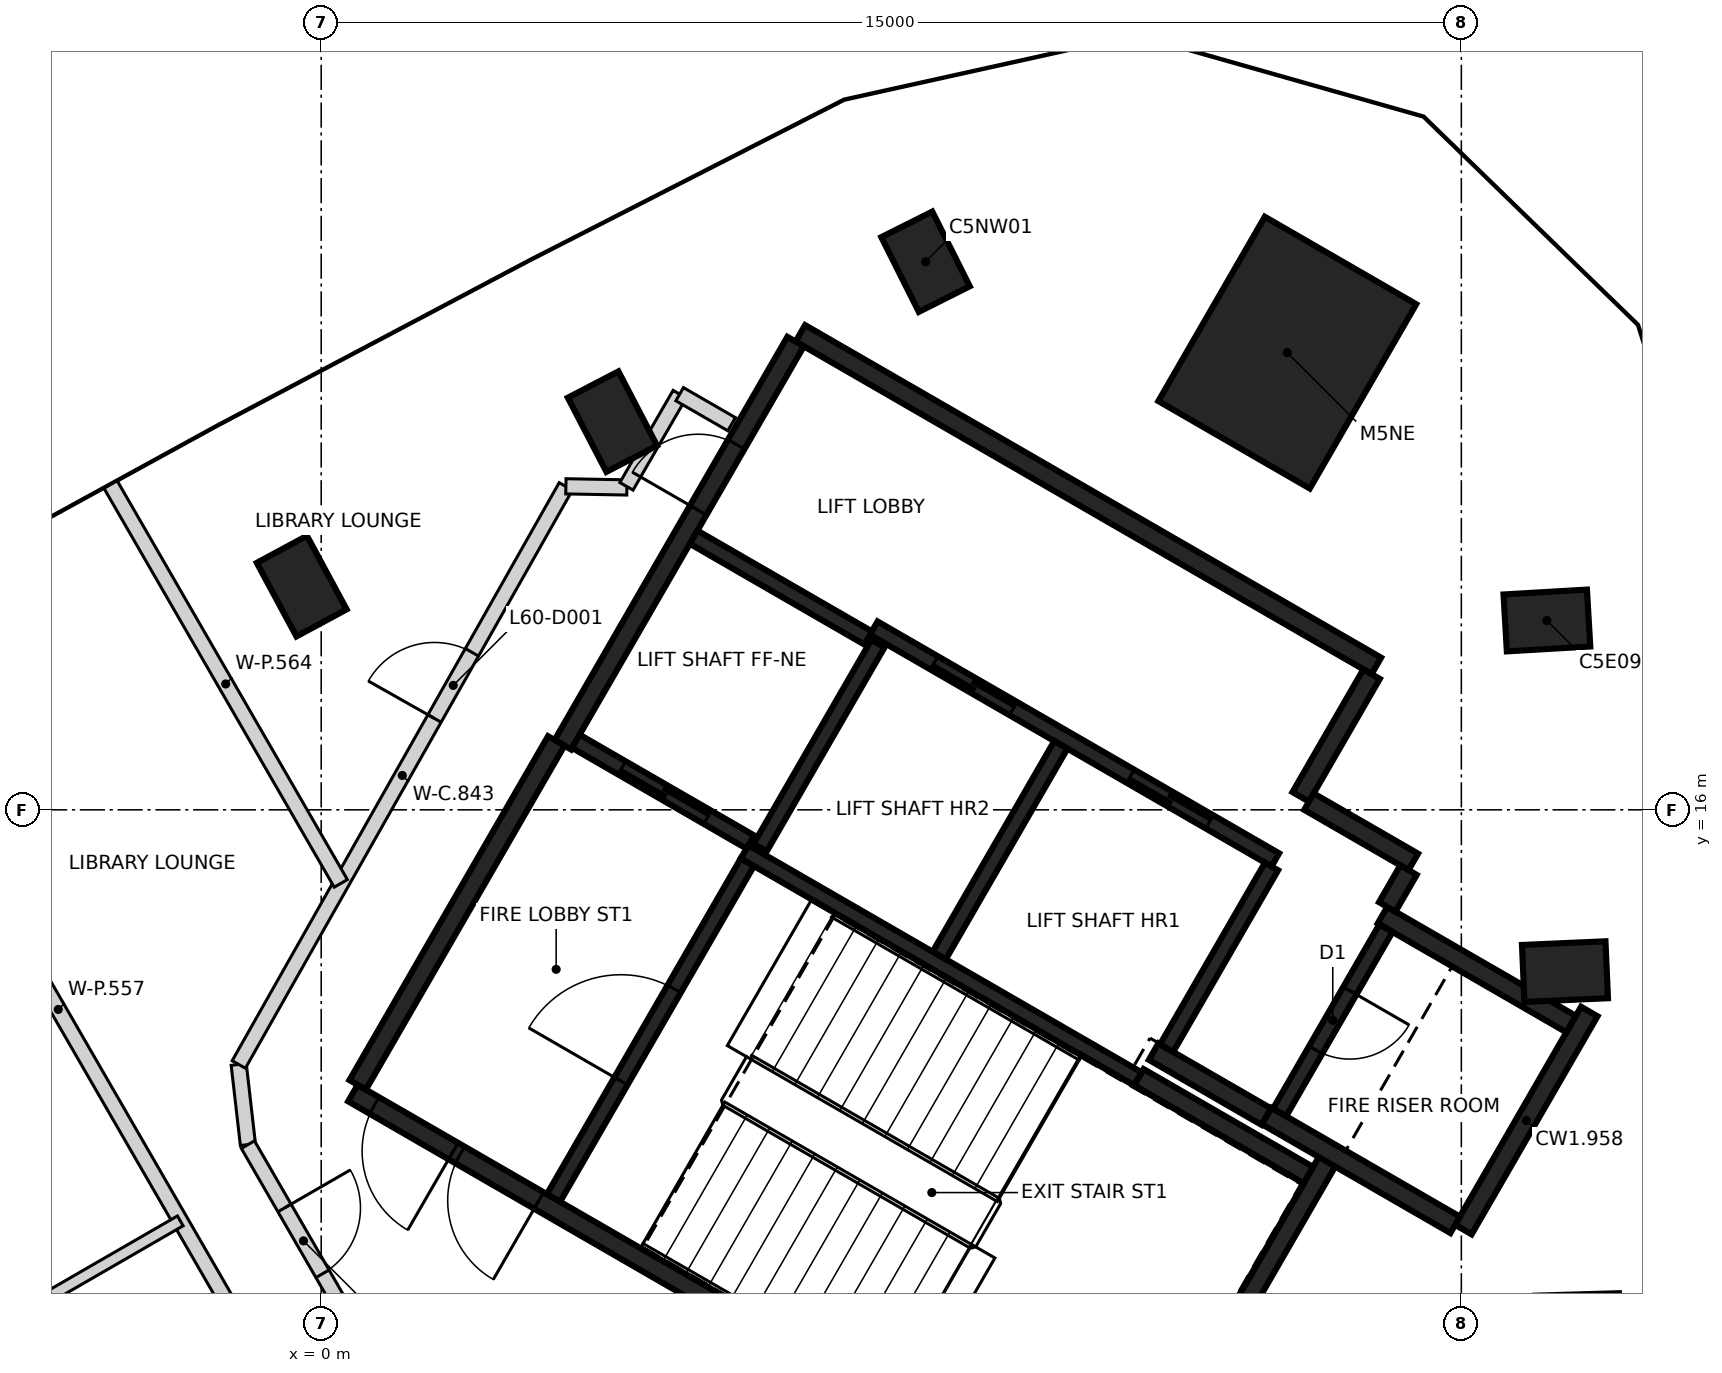
"""IFC4 building model, lengths in metres.
Left out: names, types, materials, properties, quantities, classifications, styles, units other than length and angle.
Written with IfcOpenShell. Run it as: python <this file> out.ifc"""

import sys

from ifc_helpers import new_model, si_unit, direction, frame, frame_2d, origin, origin_2d, place, context, subcontext, project, spatial, rectangle, extrude, element, fill, save


model = new_model("IFC4")
c1 = context("Model", 3, precision=1e-05, world=origin(), true_north=direction((0.0, 1.0)))
c2 = subcontext(c1, "Body", "Model", "MODEL_VIEW")
j1 = project(units=[si_unit("LENGTHUNIT", "METRE"), si_unit("PLANEANGLEUNIT", "RADIAN")], contexts=[c1])
p1 = place(None, origin())
s1 = spatial("IfcSite", under=j1, at=p1, CompositionType="ELEMENT")
p2 = place(p1, origin())
s2 = spatial("IfcBuilding", under=s1, at=p2, CompositionType="ELEMENT")
p3 = place(p2, frame((0.0, 0.0, 239.4)))
s3 = spatial("IfcBuildingStorey", under=s2, at=p3, CompositionType="ELEMENT", Elevation=239.4)
for number, where, z_axis, x_axis in (
    (1, (16.363, 13.872, -0.35), (0.0, 0.0, 1.0), (0.999, 0.044, 0.0)),
    (2, (16.125, 18.491, -0.35), (0.0, 0.0, 1.0), (0.998, 0.058, 0.0)),
    (3, (7.951, 23.211, -0.35), (0.0, 0.0, 1.0), (-0.449, 0.894, 0.0)),
    (4, (3.832, 21.107, -0.35), (0.0, 0.0, 1.0), (-0.461, 0.887, 0.0)),
    (5, (-0.256, 18.943, -0.35), (0.0, 0.0, 1.0), (-0.475, 0.88, 0.0)),
):
    element("IfcColumn", number, at=place(p3, frame(where, z_axis=z_axis, x_axis=x_axis)), inside=s3, PredefinedType="COLUMN", context=c2, shape_type="SweptSolid", body=[
        extrude(rectangle(XDim=1.1, YDim=0.75, at=origin_2d()), origin(), (0.0, 0.0, 1.0), 3.6),
    ])
p4 = place(p3, frame((12.71, 22.015, -0.35), z_axis=(0.0, 0.0, 1.0), x_axis=(0.5, 0.866025403784, 0.0)))
e6 = element("IfcColumn", 6, at=p4, inside=s3, PredefinedType="COLUMN", context=c2, shape_type="SweptSolid", body=[
    extrude(rectangle(XDim=2.8, YDim=2.3, at=origin_2d()), origin(), (0.0, 0.0, 1.0), 3.6),
])
p5 = place(p3, frame((10.42, 6.498, 0.0), z_axis=(0.0, 0.0, 1.0), x_axis=(-0.866021906294, 0.500006057782, 0.0)))
e7 = element("IfcWall", 7, at=p5, inside=s3, PredefinedType="SHEAR", context=c2, shape_type="SweptSolid", body=[
    extrude(rectangle(XDim=11.55, YDim=0.25, at=frame_2d((5.775, 0.0))), origin(), (0.0, 0.0, 1.0), 3.25),
])
p6 = place(p5, frame((10.025, 0.0, 0.0)))
e8 = element("IfcOpeningElement", 8, at=p6, cuts=e7, PredefinedType="OPENING", context=c2, shape_type="SweptSolid", body=[
    extrude(rectangle(XDim=1.2, YDim=2.1, at=frame_2d((0.6, 1.05))), frame((0.0, 0.135, 0.0), z_axis=(0.0, -1.0, 0.0), x_axis=(1.0, 0.0, 0.0)), (0.0, 0.0, 1.0), 0.27),
])
p7 = place(p5, frame((8.725, 0.0, 0.0)))
e9 = element("IfcOpeningElement", 9, at=p7, cuts=e7, PredefinedType="OPENING", context=c2, shape_type="SweptSolid", body=[
    extrude(rectangle(XDim=1.2, YDim=2.1, at=frame_2d((0.6, 1.05))), frame((0.0, 0.135, 0.0), z_axis=(0.0, -1.0, 0.0), x_axis=(1.0, 0.0, 0.0)), (0.0, 0.0, 1.0), 0.27),
])
p8 = place(p3, frame((6.304, 22.269, 0.0), z_axis=(0.0, 0.0, 1.0), x_axis=(0.866022959057, -0.500004234368, 0.0)))
e10 = element("IfcWall", 10, at=p8, inside=s3, PredefinedType="SHEAR", context=c2, shape_type="SweptSolid", body=[
    extrude(rectangle(XDim=8.75, YDim=0.25, at=frame_2d((4.375, 0.0))), origin(), (0.0, 0.0, 1.0), 3.25),
])
p9 = place(p3, frame((3.179, 16.856, 0.0), z_axis=(0.0, 0.0, 1.0), x_axis=(0.500001955336, 0.866024274868, 0.0)))
e11 = element("IfcWall", 11, at=p9, inside=s3, PredefinedType="SHEAR", context=c2, shape_type="SweptSolid", body=[
    extrude(rectangle(XDim=6.125, YDim=0.25, at=frame_2d((3.062, 0.0))), origin(), (0.0, 0.0, 1.0), 3.25),
])
p10 = place(p9, frame((3.563, 0.0, 0.0)))
e12 = element("IfcOpeningElement", 12, at=p10, cuts=e11, PredefinedType="OPENING", context=c2, shape_type="SweptSolid", body=[
    extrude(rectangle(XDim=1.0, YDim=2.1, at=frame_2d((0.5, 1.05))), frame((0.0, 0.135, 0.0), z_axis=(0.0, -1.0, 0.0), x_axis=(1.0, 0.0, 0.0)), (0.0, 0.0, 1.0), 0.27),
])
p11 = place(p3, frame((0.48, 12.381, 0.0), z_axis=(0.0, 0.0, 1.0), x_axis=(0.49999885962, 0.866026062182, 0.0)))
e13 = element("IfcWall", 13, at=p11, inside=s3, PredefinedType="SHEAR", context=c2, shape_type="SweptSolid", body=[
    extrude(rectangle(XDim=5.225, YDim=0.25, at=frame_2d((2.612, 0.0))), origin(), (0.0, 0.0, 1.0), 3.25),
])
p12 = place(p3, frame((13.238, 11.378, 0.0), z_axis=(0.0, 0.0, 1.0), x_axis=(-0.500008851346, -0.866020293397, 0.0)))
e14 = element("IfcWall", 14, at=p12, inside=s3, PredefinedType="SHEAR", context=c2, shape_type="SweptSolid", body=[
    extrude(rectangle(XDim=5.51, YDim=0.25, at=frame_2d((2.755, 0.0))), origin(), (0.0, 0.0, 1.0), 3.25),
])
p13 = place(p3, frame((16.684, 13.347, 0.0), z_axis=(0.0, 0.0, 1.0), x_axis=(-0.499998874531, -0.866026053573, 0.0)))
e15 = element("IfcWall", 15, at=p13, inside=s3, PredefinedType="SHEAR", context=c2, shape_type="SweptSolid", body=[
    extrude(rectangle(XDim=3.313, YDim=0.25, at=frame_2d((1.656, 0.0))), origin(), (0.0, 0.0, 1.0), 3.25),
])
p14 = place(p3, frame((14.918, 10.54, 0.0), z_axis=(0.0, 0.0, 1.0), x_axis=(-0.866063538972, 0.499933942099, 0.0)))
e16 = element("IfcWall", 16, at=p14, inside=s3, PredefinedType="SHEAR", context=c2, shape_type="SweptSolid", body=[
    extrude(rectangle(XDim=2.865, YDim=0.25, at=frame_2d((1.432, 0.0))), origin(), (0.0, 0.0, 1.0), 3.25),
])
p15 = place(p3, frame((13.963, 14.614, 0.0), z_axis=(0.0, 0.0, 1.0), x_axis=(0.866042235819, -0.499970844928, 0.0)))
e17 = element("IfcWall", 17, at=p15, inside=s3, PredefinedType="SHEAR", context=c2, shape_type="SweptSolid", body=[
    extrude(rectangle(XDim=2.865, YDim=0.25, at=frame_2d((1.432, 0.0))), origin(), (0.0, 0.0, 1.0), 3.25),
])
p16 = place(p3, frame((10.757, 12.481, 0.0), z_axis=(0.0, 0.0, 1.0), x_axis=(0.866022940537, -0.500004266446, 0.0)))
e18 = element("IfcWall", 18, at=p16, inside=s3, PredefinedType="SHEAR", context=c2, shape_type="SweptSolid", body=[
    extrude(rectangle(XDim=2.575, YDim=0.25, at=frame_2d((1.287, 0.0))), origin(), (0.0, 0.0, 1.0), 3.25),
])
p17 = place(p3, frame((13.819, 17.785, 0.0), z_axis=(0.0, 0.0, 1.0), x_axis=(-0.500039802285, -0.866002422705, 0.0)))
e19 = element("IfcWall", 19, at=p17, inside=s3, PredefinedType="SHEAR", context=c2, shape_type="SweptSolid", body=[
    extrude(rectangle(XDim=1.865, YDim=0.25, at=frame_2d((0.932, 0.0))), origin(), (0.0, 0.0, 1.0), 3.25),
])
p18 = place(p3, frame((12.433, 11.964, 0.0), z_axis=(0.0, 0.0, 1.0), x_axis=(-0.866038183914, 0.499977863513, 0.0)))
e20 = element("IfcWall", 20, at=p18, inside=s3, PredefinedType="SHEAR", context=c2, shape_type="SweptSolid", body=[
    extrude(rectangle(XDim=1.71, YDim=0.25, at=frame_2d((0.855, 0.0))), origin(), (0.0, 0.0, 1.0), 3.25),
])
p19 = place(p3, frame((12.995, 16.108, 0.0), z_axis=(0.0, 0.0, 1.0), x_axis=(0.866044474677, -0.49996696679, 0.0)))
e21 = element("IfcWall", 21, at=p19, inside=s3, PredefinedType="SHEAR", context=c2, shape_type="SweptSolid", body=[
    extrude(rectangle(XDim=1.584, YDim=0.25, at=frame_2d((0.792, 0.0))), origin(), (0.0, 0.0, 1.0), 3.25),
])
p20 = place(p3, frame((14.305, 15.207, 0.0), z_axis=(0.0, 0.0, 1.0), x_axis=(-0.499848422343, -0.866112899501, 0.0)))
e22 = element("IfcWall", 22, at=p20, inside=s3, PredefinedType="SHEAR", context=c2, shape_type="SweptSolid", body=[
    extrude(rectangle(XDim=0.559, YDim=0.25, at=frame_2d((0.28, 0.0))), origin(), (0.0, 0.0, 1.0), 3.25),
])
p21 = place(p3, frame((12.552, 15.342, 0.0), z_axis=(0.0, 0.0, 1.0), x_axis=(-0.866030299012, 0.499991521122, 0.0)))
e23 = element("IfcWall", 23, at=p21, inside=s3, PredefinedType="SHEAR", context=c2, shape_type="SweptSolid", body=[
    extrude(rectangle(XDim=6.1, YDim=0.2, at=frame_2d((3.05, 0.0))), origin(), (0.0, 0.0, 1.0), 3.25),
])
p22 = place(p21, frame((1.0, 0.0, 0.0)))
e24 = element("IfcOpeningElement", 24, at=p22, cuts=e23, PredefinedType="OPENING", context=c2, shape_type="SweptSolid", body=[
    extrude(rectangle(XDim=1.2, YDim=2.1, at=frame_2d((0.6, 1.05))), frame((0.0, 0.11, 0.0), z_axis=(0.0, -1.0, 0.0), x_axis=(1.0, 0.0, 0.0)), (0.0, 0.0, 1.0), 0.22),
])
p23 = place(p21, frame((3.982, 0.0, 0.0)))
e25 = element("IfcOpeningElement", 25, at=p23, cuts=e23, PredefinedType="OPENING", context=c2, shape_type="SweptSolid", body=[
    extrude(rectangle(XDim=1.2, YDim=2.1, at=frame_2d((0.6, 1.05))), frame((0.0, 0.11, 0.0), z_axis=(0.0, -1.0, 0.0), x_axis=(1.0, 0.0, 0.0)), (0.0, 0.0, 1.0), 0.22),
])
p24 = place(p3, frame((10.743, 12.46, 0.0), z_axis=(0.0, 0.0, 1.0), x_axis=(-0.866018848283, 0.500011354289, 0.0)))
e26 = element("IfcWall", 26, at=p24, inside=s3, PredefinedType="SHEAR", context=c2, shape_type="SweptSolid", body=[
    extrude(rectangle(XDim=5.974, YDim=0.2, at=frame_2d((2.987, 0.0))), origin(), (0.0, 0.0, 1.0), 3.25),
])
p25 = place(p3, frame((3.057, 10.895, 0.0), z_axis=(0.0, 0.0, 1.0), x_axis=(0.500027839223, 0.866009330205, 0.0)))
e27 = element("IfcWall", 27, at=p25, inside=s3, PredefinedType="SHEAR", context=c2, shape_type="SweptSolid", body=[
    extrude(rectangle(XDim=5.098, YDim=0.2, at=frame_2d((2.549, 0.0))), origin(), (0.0, 0.0, 1.0), 3.25),
])
p26 = place(p25, frame((1.774, 0.0, 0.0)))
e28 = element("IfcOpeningElement", 28, at=p26, cuts=e27, PredefinedType="OPENING", context=c2, shape_type="SweptSolid", body=[
    extrude(rectangle(XDim=1.4, YDim=2.1, at=frame_2d((0.7, 1.05))), frame((0.0, 0.11, 0.0), z_axis=(0.0, -1.0, 0.0), x_axis=(1.0, 0.0, 0.0)), (0.0, 0.0, 1.0), 0.22),
])
p27 = place(p3, frame((8.132, 14.084, 0.0), z_axis=(0.0, 0.0, 1.0), x_axis=(0.500030834389, 0.86600760081, 0.0)))
e29 = element("IfcWall", 29, at=p27, inside=s3, PredefinedType="SHEAR", context=c2, shape_type="SweptSolid", body=[
    extrude(rectangle(XDim=3.198, YDim=0.2, at=frame_2d((1.599, 0.0))), origin(), (0.0, 0.0, 1.0), 3.25),
])
p28 = place(p3, frame((14.008, 14.442, 0.0), z_axis=(0.0, 0.0, 1.0), x_axis=(-0.499986818241, -0.866033014143, 0.0)))
e30 = element("IfcWall", 30, at=p28, inside=s3, PredefinedType="SHEAR", context=c2, shape_type="SweptSolid", body=[
    extrude(rectangle(XDim=2.798, YDim=0.2, at=frame_2d((1.399, 0.0))), origin(), (0.0, 0.0, 1.0), 3.25),
])
p29 = place(p28, frame((0.949, 0.0, 0.0)))
e31 = element("IfcOpeningElement", 31, at=p29, cuts=e30, PredefinedType="OPENING", context=c2, shape_type="SweptSolid", body=[
    extrude(rectangle(XDim=0.9, YDim=2.1, at=frame_2d((0.45, 1.05))), frame((0.0, 0.11, 0.0), z_axis=(0.0, -1.0, 0.0), x_axis=(1.0, 0.0, 0.0)), (0.0, 0.0, 1.0), 0.22),
])
p30 = place(p3, frame((12.502, 15.255, 0.0), z_axis=(0.0, 0.0, 1.0), x_axis=(-0.499965018551, -0.866045599391, 0.0)))
e32 = element("IfcWall", 32, at=p30, inside=s3, PredefinedType="SHEAR", context=c2, shape_type="SweptSolid", body=[
    extrude(rectangle(XDim=2.759, YDim=0.2, at=frame_2d((1.379, 0.0))), origin(), (0.0, 0.0, 1.0), 3.25),
])
p31 = place(p3, frame((7.324, 18.187, 0.0), z_axis=(0.0, 0.0, 1.0), x_axis=(-0.499967891604, -0.866043940782, 0.0)))
e33 = element("IfcWall", 33, at=p31, inside=s3, PredefinedType="SHEAR", context=c2, shape_type="SweptSolid", body=[
    extrude(rectangle(XDim=3.1, YDim=0.2, at=frame_2d((1.55, 0.0))), origin(), (0.0, 0.0, 1.0), 3.25),
])
p32 = place(p3, frame((5.646, 15.576, 0.0), z_axis=(0.0, 0.0, 1.0), x_axis=(-0.866018407898, 0.500012117035, 0.0)))
e34 = element("IfcWall", 34, at=p32, inside=s3, PredefinedType="SHEAR", context=c2, shape_type="SweptSolid", body=[
    extrude(rectangle(XDim=2.651, YDim=0.2, at=frame_2d((1.325, 0.0))), origin(), (0.0, 0.0, 1.0), 3.25),
])
p33 = place(p32, frame((0.652, 0.0, 0.0)))
e35 = element("IfcOpeningElement", 35, at=p33, cuts=e34, PredefinedType="OPENING", context=c2, shape_type="SweptSolid", body=[
    extrude(rectangle(XDim=1.3, YDim=2.1, at=frame_2d((0.65, 1.05))), frame((0.0, 0.11, 0.0), z_axis=(0.0, -1.0, 0.0), x_axis=(1.0, 0.0, 0.0)), (0.0, 0.0, 1.0), 0.22),
])
p34 = place(p3, frame((7.196, 18.26, 0.0), z_axis=(0.0, 0.0, 1.0), x_axis=(-0.866018407898, 0.500012117035, 0.0)))
e36 = element("IfcWall", 36, at=p34, inside=s3, PredefinedType="SHEAR", context=c2, shape_type="SweptSolid", body=[
    extrude(rectangle(XDim=2.651, YDim=0.2, at=frame_2d((1.325, 0.0))), origin(), (0.0, 0.0, 1.0), 3.25),
])
p35 = place(p3, frame((-1.085, 12.65, 0.0), z_axis=(0.0, 0.0, 1.0), x_axis=(0.113812454263, -0.993502252264, 0.0)))
e37 = element("IfcWall", 37, at=p35, inside=s3, PredefinedType="PARTITIONING", context=c2, shape_type="SweptSolid", body=[
    extrude(rectangle(XDim=1.062, YDim=0.2, at=frame_2d((0.531, 0.0))), origin(), (0.0, 0.0, 1.0), 3.25),
])
p36 = place(p3, frame((-1.084, 12.65, 0.0), z_axis=(0.0, 0.0, 1.0), x_axis=(0.492373019537, 0.87038428848, 0.0)))
e38 = element("IfcWall", 38, at=p36, inside=s3, PredefinedType="PARTITIONING", context=c2, shape_type="SweptSolid", body=[
    extrude(rectangle(XDim=8.738, YDim=0.2, at=frame_2d((4.369, 0.0))), origin(), (0.0, 0.0, 1.0), 3.25),
])
p37 = place(p36, frame((5.23, 0.0, 0.0)))
e39 = element("IfcOpeningElement", 39, at=p37, cuts=e38, PredefinedType="OPENING", context=c2, shape_type="SweptSolid", body=[
    extrude(rectangle(XDim=1.0, YDim=2.1, at=frame_2d((0.5, 1.05))), frame((0.0, 0.11, 0.0), z_axis=(0.0, -1.0, 0.0), x_axis=(1.0, 0.0, 0.0)), (0.0, 0.0, 1.0), 0.22),
])
p38 = place(p3, frame((-0.964, 11.595, 0.0), z_axis=(0.0, 0.0, 1.0), x_axis=(0.500081432713, -0.865978383481, 0.0)))
e40 = element("IfcWall", 40, at=p38, inside=s3, PredefinedType="PARTITIONING", context=c2, shape_type="SweptSolid", body=[
    extrude(rectangle(XDim=2.924, YDim=0.2, at=frame_2d((1.462, 0.0))), origin(), (0.0, 0.0, 1.0), 3.25),
])
p39 = place(p38, frame((0.962, 0.0, 0.0)))
e41 = element("IfcOpeningElement", 41, at=p39, cuts=e40, PredefinedType="OPENING", context=c2, shape_type="SweptSolid", body=[
    extrude(rectangle(XDim=1.0, YDim=2.1, at=frame_2d((0.5, 1.05))), frame((0.0, 0.11, 0.0), z_axis=(0.0, -1.0, 0.0), x_axis=(1.0, 0.0, 0.0)), (0.0, 0.0, 1.0), 0.22),
])
p40 = place(p3, frame((3.219, 20.256, 0.0), z_axis=(0.0, 0.0, 1.0), x_axis=(0.99982237262, -0.0188473661, 0.0)))
e42 = element("IfcWall", 42, at=p40, inside=s3, PredefinedType="PARTITIONING", context=c2, shape_type="SweptSolid", body=[
    extrude(rectangle(XDim=0.803, YDim=0.2, at=frame_2d((0.402, 0.0))), origin(), (0.0, 0.0, 1.0), 3.25),
])
p41 = place(p3, frame((4.016, 20.256, 0.0), z_axis=(0.0, 0.0, 1.0), x_axis=(0.500135180047, 0.865947343479, 0.0)))
e43 = element("IfcWall", 43, at=p41, inside=s3, PredefinedType="PARTITIONING", context=c2, shape_type="SweptSolid", body=[
    extrude(rectangle(XDim=1.399, YDim=0.2, at=frame_2d((0.7, 0.0))), origin(), (0.0, 0.0, 1.0), 2.35),
])
p42 = place(p3, frame((4.716, 21.468, 0.0), z_axis=(0.0, 0.0, 1.0), x_axis=(0.865912682783, -0.500195187698, 0.0)))
e44 = element("IfcWall", 44, at=p42, inside=s3, PredefinedType="PARTITIONING", context=c2, shape_type="SweptSolid", body=[
    extrude(rectangle(XDim=0.79, YDim=0.2, at=frame_2d((0.395, 0.0))), origin(), (0.0, 0.0, 1.0), 2.35),
])
p43 = place(p3, frame((-6.315, 18.32, 0.0), z_axis=(0.0, 0.0, 1.0), x_axis=(0.500012296027, -0.866018304553, 0.0)))
e45 = element("IfcWall", 45, at=p43, inside=s3, PredefinedType="PARTITIONING", context=c2, shape_type="SweptSolid", body=[
    extrude(rectangle(XDim=11.423, YDim=0.2, at=frame_2d((5.711, 0.0))), origin(), (0.0, 0.0, 1.0), 2.35),
])
p44 = place(p3, frame((-2.771, 20.279, 0.0), z_axis=(0.0, 0.0, 1.0), x_axis=(0.499939878606, -0.866060112105, 0.0)))
e46 = element("IfcWall", 46, at=p44, inside=s3, PredefinedType="PARTITIONING", context=c2, shape_type="SweptSolid", body=[
    extrude(rectangle(XDim=6.059, YDim=0.2, at=frame_2d((3.029, 0.0))), origin(), (0.0, 0.0, 1.0), 2.35),
])
p45 = place(p3, frame((-3.664, 9.547, 0.0), z_axis=(0.0, 0.0, 1.0), x_axis=(0.866049423672, 0.499958394027, 0.0)))
e47 = element("IfcWall", 47, at=p45, inside=s3, PredefinedType="PARTITIONING", context=c2, shape_type="SweptSolid", body=[
    extrude(rectangle(XDim=2.09, YDim=0.15, at=frame_2d((1.045, 0.0))), origin(), (0.0, 0.0, 1.0), 3.25),
])
p46 = place(p33, origin())
e48 = element("IfcDoor", 48, at=p46, inside=s3, OperationType="SLIDING_TO_LEFT", PredefinedType="DOOR", context=c2, shape_type="SweptSolid", body=[
    extrude(rectangle(XDim=1.3, YDim=2.1, at=frame_2d((0.65, 1.05))), frame((0.0, 0.025, 0.0), z_axis=(0.0, -1.0, 0.0), x_axis=(1.0, 0.0, 0.0)), (0.0, 0.0, 1.0), 0.05),
])
fill(e35, e48)
p47 = place(p22, origin())
e49 = element("IfcDoor", 49, at=p47, inside=s3, OperationType="DOUBLE_DOOR_SLIDING", PredefinedType="DOOR", context=c2, shape_type="SweptSolid", body=[
    extrude(rectangle(XDim=1.2, YDim=2.1, at=frame_2d((0.6, 1.05))), frame((0.0, 0.025, 0.0), z_axis=(0.0, -1.0, 0.0), x_axis=(1.0, 0.0, 0.0)), (0.0, 0.0, 1.0), 0.05),
])
fill(e24, e49)
p48 = place(p23, origin())
e50 = element("IfcDoor", 50, at=p48, inside=s3, OperationType="DOUBLE_DOOR_SLIDING", PredefinedType="DOOR", context=c2, shape_type="SweptSolid", body=[
    extrude(rectangle(XDim=1.2, YDim=2.1, at=frame_2d((0.6, 1.05))), frame((0.0, 0.025, 0.0), z_axis=(0.0, -1.0, 0.0), x_axis=(1.0, 0.0, 0.0)), (0.0, 0.0, 1.0), 0.05),
])
fill(e25, e50)
p49 = place(p10, origin())
e51 = element("IfcDoor", 51, at=p49, inside=s3, OperationType="SINGLE_SWING_LEFT", PredefinedType="DOOR", context=c2, shape_type="SweptSolid", body=[
    extrude(rectangle(XDim=1.0, YDim=2.1, at=frame_2d((0.5, 1.05))), frame((0.0, 0.025, 0.0), z_axis=(0.0, -1.0, 0.0), x_axis=(1.0, 0.0, 0.0)), (0.0, 0.0, 1.0), 0.05),
])
fill(e12, e51)
p50 = place(p6, origin())
e52 = element("IfcDoor", 52, at=p50, inside=s3, OperationType="SINGLE_SWING_LEFT", PredefinedType="DOOR", context=c2, shape_type="SweptSolid", body=[
    extrude(rectangle(XDim=1.2, YDim=2.1, at=frame_2d((0.6, 1.05))), frame((0.0, 0.025, 0.0), z_axis=(0.0, -1.0, 0.0), x_axis=(1.0, 0.0, 0.0)), (0.0, 0.0, 1.0), 0.05),
])
fill(e8, e52)
p51 = place(p7, origin())
e53 = element("IfcDoor", 53, at=p51, inside=s3, OperationType="SINGLE_SWING_RIGHT", PredefinedType="DOOR", context=c2, shape_type="SweptSolid", body=[
    extrude(rectangle(XDim=1.2, YDim=2.1, at=frame_2d((0.6, 1.05))), frame((0.0, 0.025, 0.0), z_axis=(0.0, -1.0, 0.0), x_axis=(1.0, 0.0, 0.0)), (0.0, 0.0, 1.0), 0.05),
])
fill(e9, e53)
p52 = place(p26, origin())
e54 = element("IfcDoor", 54, at=p52, inside=s3, OperationType="SINGLE_SWING_LEFT", PredefinedType="DOOR", context=c2, shape_type="SweptSolid", body=[
    extrude(rectangle(XDim=1.4, YDim=2.1, at=frame_2d((0.7, 1.05))), frame((0.0, 0.025, 0.0), z_axis=(0.0, -1.0, 0.0), x_axis=(1.0, 0.0, 0.0)), (0.0, 0.0, 1.0), 0.05),
])
fill(e28, e54)
p53 = place(p29, origin())
e55 = element("IfcDoor", 55, at=p53, inside=s3, OperationType="SINGLE_SWING_RIGHT", PredefinedType="DOOR", context=c2, shape_type="SweptSolid", body=[
    extrude(rectangle(XDim=0.9, YDim=2.1, at=frame_2d((0.45, 1.05))), frame((0.0, 0.025, 0.0), z_axis=(0.0, -1.0, 0.0), x_axis=(1.0, 0.0, 0.0)), (0.0, 0.0, 1.0), 0.05),
])
fill(e31, e55)
p54 = place(p37, origin())
e56 = element("IfcDoor", 56, at=p54, inside=s3, OperationType="SINGLE_SWING_LEFT", PredefinedType="DOOR", context=c2, shape_type="SweptSolid", body=[
    extrude(rectangle(XDim=1.0, YDim=2.1, at=frame_2d((0.5, 1.05))), frame((0.0, 0.025, 0.0), z_axis=(0.0, -1.0, 0.0), x_axis=(1.0, 0.0, 0.0)), (0.0, 0.0, 1.0), 0.05),
])
fill(e39, e56)
p55 = place(p39, origin())
e57 = element("IfcDoor", 57, at=p55, inside=s3, OperationType="SINGLE_SWING_LEFT", PredefinedType="DOOR", context=c2, shape_type="SweptSolid", body=[
    extrude(rectangle(XDim=1.0, YDim=2.1, at=frame_2d((0.5, 1.05))), frame((0.0, 0.025, 0.0), z_axis=(0.0, -1.0, 0.0), x_axis=(1.0, 0.0, 0.0)), (0.0, 0.0, 1.0), 0.05),
])
fill(e41, e57)
save(model, sys.argv[1])
